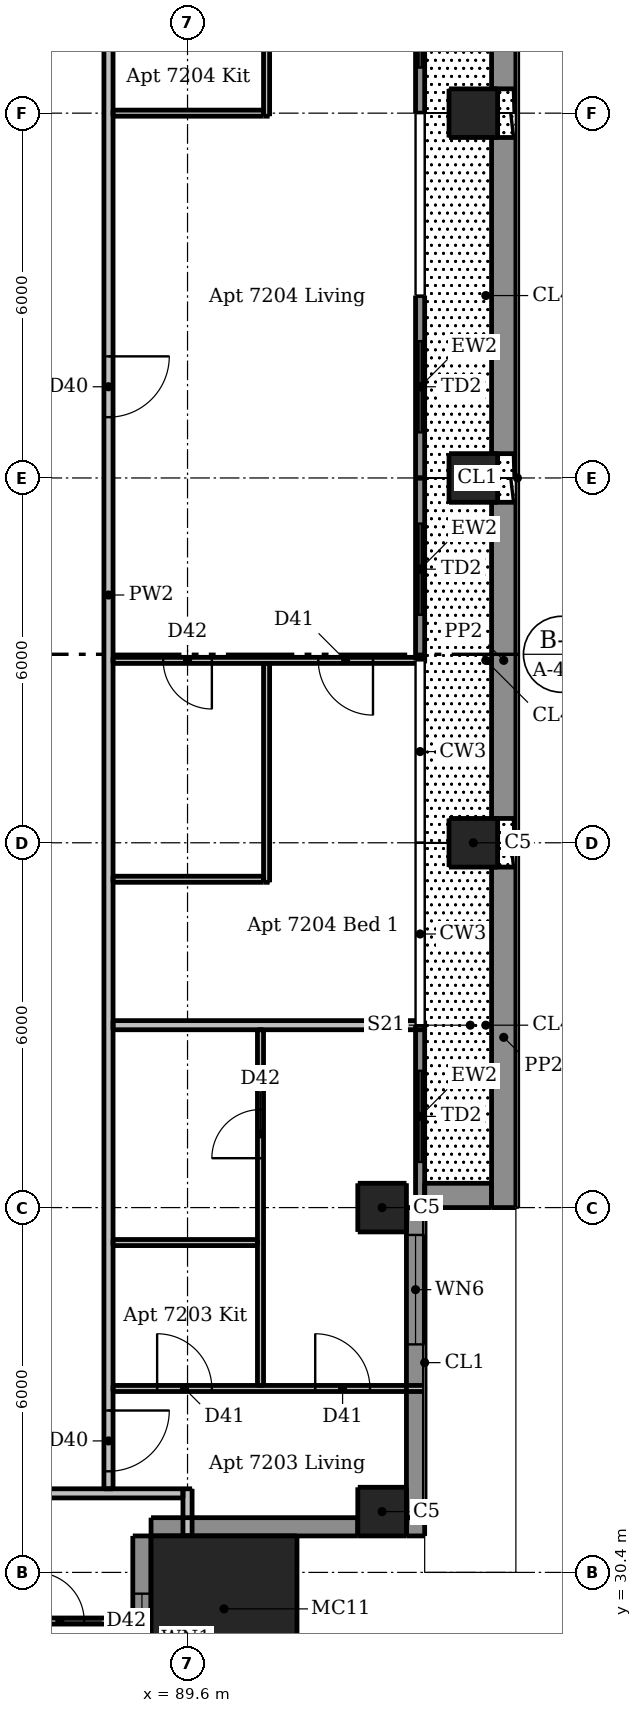
"""IFC4 building model, lengths in metres.
Left out: names, types, materials, properties, quantities, classifications, styles, units other than length and angle.
Written with IfcOpenShell. Run it as: python <this file> out.ifc"""

import sys

from ifc_helpers import new_model, si_unit, direction, frame, frame_2d, origin, origin_2d, place, context, subcontext, project, spatial, rectangle, extrude, element, fill, save


model = new_model("IFC4")
c1 = context("Model", 3, precision=1e-05, world=origin(), true_north=direction((0.0, 1.0)))
c2 = subcontext(c1, "Body", "Model", "MODEL_VIEW")
j1 = project(units=[si_unit("LENGTHUNIT", "METRE"), si_unit("PLANEANGLEUNIT", "RADIAN")], contexts=[c1])
p1 = place(None, origin())
s1 = spatial("IfcSite", under=j1, at=p1, CompositionType="ELEMENT")
p2 = place(p1, origin())
s2 = spatial("IfcBuilding", under=s1, at=p2, CompositionType="ELEMENT")
p3 = place(p2, frame((0.0, 0.0, 268.6)))
s3 = spatial("IfcBuildingStorey", under=s2, at=p3, CompositionType="ELEMENT", Elevation=268.6)
for number, where, z_axis, x_axis in (
    (1, (92.8, 31.4, 0.0), (0.0, 0.0, 1.0), (1.0, 0.0, 0.0)),
    (2, (92.8, 36.4, 0.0), (0.0, 0.0, 1.0), (1.0, 0.0, 0.0)),
):
    element("IfcColumn", number, at=place(p3, frame(where, z_axis=z_axis, x_axis=x_axis)), inside=s3, PredefinedType="COLUMN", context=c2, shape_type="SweptSolid", body=[
        extrude(rectangle(XDim=0.8, YDim=0.8, at=origin_2d()), origin(), (0.0, 0.0, 1.0), 3.05),
    ])
for number, where, z_axis, x_axis in (
    (3, (94.3, 42.4, 0.0), (0.0, 0.0, 1.0), (1.0, 0.0, 0.0)),
    (4, (94.3, 48.4, 0.0), (0.0, 0.0, 1.0), (1.0, 0.0, 0.0)),
    (5, (94.3, 54.4, 0.0), (0.0, 0.0, 1.0), (1.0, 0.0, 0.0)),
):
    element("IfcColumn", number, at=place(p3, frame(where, z_axis=z_axis, x_axis=x_axis)), inside=s3, PredefinedType="COLUMN", context=c2, shape_type="SweptSolid", body=[
        extrude(rectangle(XDim=0.8, YDim=0.8, at=origin_2d()), origin(), (0.0, 0.0, 1.0), 3.3),
    ])
p4 = place(p3, frame((90.2, 29.8, 0.0), z_axis=(0.0, 0.0, 1.0), x_axis=(1.0, 0.0, 0.0)))
e6 = element("IfcColumn", 6, at=p4, inside=s3, PredefinedType="COLUMN", context=c2, shape_type="SweptSolid", body=[
    extrude(rectangle(XDim=2.4, YDim=2.4, at=origin_2d()), origin(), (0.0, 0.0, 1.0), 3.3),
])
p5 = place(p3, frame((88.85, 27.6, 0.0), z_axis=(0.0, 0.0, 1.0), x_axis=(0.0, 1.0, 0.0)))
e7 = element("IfcWall", 7, at=p5, inside=s3, PredefinedType="SOLIDWALL", context=c2, shape_type="SweptSolid", body=[
    extrude(rectangle(XDim=3.4, YDim=0.3, at=frame_2d((1.7, 0.0))), origin(), (0.0, 0.0, 1.0), 3.05),
])
p6 = place(p5, frame((0.95, 0.0, 0.9)))
e8 = element("IfcOpeningElement", 8, at=p6, cuts=e7, PredefinedType="OPENING", context=c2, shape_type="SweptSolid", body=[
    extrude(rectangle(XDim=1.5, YDim=1.5, at=frame_2d((0.75, 0.75))), frame((0.0, 0.16, 0.0), z_axis=(0.0, -1.0, 0.0), x_axis=(1.0, 0.0, 0.0)), (0.0, 0.0, 1.0), 0.32),
])
p7 = place(p3, frame((89.0, 31.15, 0.0), z_axis=(0.0, 0.0, 1.0), x_axis=(1.0, 0.0, 0.0)))
e9 = element("IfcWall", 9, at=p7, inside=s3, PredefinedType="SOLIDWALL", context=c2, shape_type="SweptSolid", body=[
    extrude(rectangle(XDim=3.4, YDim=0.3, at=frame_2d((1.7, 0.0))), origin(), (0.0, 0.0, 1.0), 3.05),
])
p8 = place(p3, frame((93.2, 31.15, 0.0), z_axis=(0.0, 0.0, 1.0), x_axis=(1.0, 0.0, 0.0)))
e10 = element("IfcWall", 10, at=p8, inside=s3, PredefinedType="SOLIDWALL", context=c2, shape_type="SweptSolid", body=[
    extrude(rectangle(XDim=0.3, YDim=0.3, at=frame_2d((0.15, 0.0))), origin(), (0.0, 0.0, 1.0), 3.05),
])
p9 = place(p3, frame((93.35, 31.3, 0.0), z_axis=(0.0, 0.0, 1.0), x_axis=(0.0, 1.0, 0.0)))
e11 = element("IfcWall", 11, at=p9, inside=s3, PredefinedType="SOLIDWALL", context=c2, shape_type="SweptSolid", body=[
    extrude(rectangle(XDim=5.1, YDim=0.3, at=frame_2d((2.55, 0.0))), origin(), (0.0, 0.0, 1.0), 3.05),
])
p10 = place(p9, frame((2.85, 0.0, 0.15)))
e12 = element("IfcOpeningElement", 12, at=p10, cuts=e11, PredefinedType="OPENING", context=c2, shape_type="SweptSolid", body=[
    extrude(rectangle(XDim=1.8, YDim=2.1, at=frame_2d((0.9, 1.05))), frame((0.0, 0.16, 0.0), z_axis=(0.0, -1.0, 0.0), x_axis=(1.0, 0.0, 0.0)), (0.0, 0.0, 1.0), 0.32),
])
p11 = place(p3, frame((93.425, 36.4, 0.0), z_axis=(0.0, 0.0, 1.0), x_axis=(0.0, 1.0, 0.0)))
e13 = element("IfcWall", 13, at=p11, inside=s3, PredefinedType="SOLIDWALL", context=c2, shape_type="SweptSolid", body=[
    extrude(rectangle(XDim=3.0, YDim=0.15, at=frame_2d((1.5, 0.0))), origin(), (0.0, 0.0, 1.0), 3.05),
])
p12 = place(p11, frame((0.75, 0.0, 0.0)))
e14 = element("IfcOpeningElement", 14, at=p12, cuts=e13, PredefinedType="OPENING", context=c2, shape_type="SweptSolid", body=[
    extrude(rectangle(XDim=1.5, YDim=2.4, at=frame_2d((0.75, 1.2))), frame((0.0, 0.085, 0.0), z_axis=(0.0, -1.0, 0.0), x_axis=(1.0, 0.0, 0.0)), (0.0, 0.0, 1.0), 0.17),
])
p13 = place(p3, frame((93.425, 45.4, 0.0), z_axis=(0.0, 0.0, 1.0), x_axis=(0.0, 1.0, 0.0)))
e15 = element("IfcWall", 15, at=p13, inside=s3, PredefinedType="SOLIDWALL", context=c2, shape_type="SweptSolid", body=[
    extrude(rectangle(XDim=3.0, YDim=0.15, at=frame_2d((1.5, 0.0))), origin(), (0.0, 0.0, 1.0), 3.05),
])
p14 = place(p13, frame((0.75, 0.0, 0.0)))
e16 = element("IfcOpeningElement", 16, at=p14, cuts=e15, PredefinedType="OPENING", context=c2, shape_type="SweptSolid", body=[
    extrude(rectangle(XDim=1.5, YDim=2.4, at=frame_2d((0.75, 1.2))), frame((0.0, 0.085, 0.0), z_axis=(0.0, -1.0, 0.0), x_axis=(1.0, 0.0, 0.0)), (0.0, 0.0, 1.0), 0.17),
])
p15 = place(p3, frame((93.425, 48.4, 0.0), z_axis=(0.0, 0.0, 1.0), x_axis=(0.0, 1.0, 0.0)))
e17 = element("IfcWall", 17, at=p15, inside=s3, PredefinedType="SOLIDWALL", context=c2, shape_type="SweptSolid", body=[
    extrude(rectangle(XDim=3.0, YDim=0.15, at=frame_2d((1.5, 0.0))), origin(), (0.0, 0.0, 1.0), 3.05),
])
p16 = place(p15, frame((0.75, 0.0, 0.0)))
e18 = element("IfcOpeningElement", 18, at=p16, cuts=e17, PredefinedType="OPENING", context=c2, shape_type="SweptSolid", body=[
    extrude(rectangle(XDim=1.5, YDim=2.4, at=frame_2d((0.75, 1.2))), frame((0.0, 0.085, 0.0), z_axis=(0.0, -1.0, 0.0), x_axis=(1.0, 0.0, 0.0)), (0.0, 0.0, 1.0), 0.17),
])
p17 = place(p3, frame((93.425, 54.4, 0.0), z_axis=(0.0, 0.0, 1.0), x_axis=(0.0, 1.0, 0.0)))
e19 = element("IfcWall", 19, at=p17, inside=s3, PredefinedType="SOLIDWALL", context=c2, shape_type="SweptSolid", body=[
    extrude(rectangle(XDim=3.0, YDim=0.15, at=frame_2d((1.5, 0.0))), origin(), (0.0, 0.0, 1.0), 3.05),
])
p18 = place(p17, frame((0.75, 0.0, 0.0)))
e20 = element("IfcOpeningElement", 20, at=p18, cuts=e19, PredefinedType="OPENING", context=c2, shape_type="SweptSolid", body=[
    extrude(rectangle(XDim=1.5, YDim=2.4, at=frame_2d((0.75, 1.2))), frame((0.0, 0.085, 0.0), z_axis=(0.0, -1.0, 0.0), x_axis=(1.0, 0.0, 0.0)), (0.0, 0.0, 1.0), 0.17),
])
p19 = place(p3, frame((94.8, 36.4, 0.03), z_axis=(0.0, 0.0, 1.0), x_axis=(0.0, 1.0, 0.0)))
e21 = element("IfcWall", 21, at=p19, inside=s3, PredefinedType="PARAPET", context=c2, shape_type="SweptSolid", body=[
    extrude(rectangle(XDim=5.6, YDim=0.4, at=frame_2d((2.8, 0.0))), origin(), (0.0, 0.0, 1.0), 1.1),
])
p20 = place(p3, frame((93.5, 36.6, 0.03), z_axis=(0.0, 0.0, 1.0), x_axis=(1.0, 0.0, 0.0)))
e22 = element("IfcWall", 22, at=p20, inside=s3, PredefinedType="PARAPET", context=c2, shape_type="SweptSolid", body=[
    extrude(rectangle(XDim=1.1, YDim=0.4, at=frame_2d((0.55, 0.0))), origin(), (0.0, 0.0, 1.0), 1.1),
])
for number, where, z_axis, x_axis in (
    (23, (94.8, 42.8, 0.03), (0.0, 0.0, 1.0), (0.0, 1.0, 0.0)),
    (24, (94.8, 48.8, 0.03), (0.0, 0.0, 1.0), (0.0, 1.0, 0.0)),
    (25, (94.8, 54.8, 0.03), (0.0, 0.0, 1.0), (0.0, 1.0, 0.0)),
):
    element("IfcWall", number, at=place(p3, frame(where, z_axis=z_axis, x_axis=x_axis)), inside=s3, PredefinedType="PARAPET", context=c2, shape_type="SweptSolid", body=[
        extrude(rectangle(XDim=5.2, YDim=0.4, at=frame_2d((2.6, 0.0))), origin(), (0.0, 0.0, 1.0), 1.1),
    ])
p21 = place(p3, frame((90.8, 33.475, 0.0), z_axis=(0.0, 0.0, 1.0), x_axis=(0.0, 1.0, 0.0)))
e26 = element("IfcWall", 26, at=p21, inside=s3, PredefinedType="PARTITIONING", context=c2, shape_type="SweptSolid", body=[
    extrude(rectangle(XDim=5.85, YDim=0.1, at=frame_2d((2.925, 0.0))), origin(), (0.0, 0.0, 1.0), 3.05),
])
p22 = place(p21, frame((3.738, 0.0, 0.0)))
e27 = element("IfcOpeningElement", 27, at=p22, cuts=e26, PredefinedType="OPENING", context=c2, shape_type="SweptSolid", body=[
    extrude(rectangle(XDim=0.8, YDim=2.1, at=frame_2d((0.4, 1.05))), frame((0.0, 0.06, 0.0), z_axis=(0.0, -1.0, 0.0), x_axis=(1.0, 0.0, 0.0)), (0.0, 0.0, 1.0), 0.12),
])
p23 = place(p3, frame((90.9, 41.75, 0.0), z_axis=(0.0, 0.0, 1.0), x_axis=(0.0, 1.0, 0.0)))
e28 = element("IfcWall", 28, at=p23, inside=s3, PredefinedType="PARTITIONING", context=c2, shape_type="SweptSolid", body=[
    extrude(rectangle(XDim=3.6, YDim=0.1, at=frame_2d((1.8, 0.0))), origin(), (0.0, 0.0, 1.0), 3.05),
])
p24 = place(p3, frame((90.9, 54.35, 0.0), z_axis=(0.0, 0.0, 1.0), x_axis=(0.0, 1.0, 0.0)))
e29 = element("IfcWall", 29, at=p24, inside=s3, PredefinedType="PARTITIONING", context=c2, shape_type="SweptSolid", body=[
    extrude(rectangle(XDim=5.975, YDim=0.1, at=frame_2d((2.987, 0.0))), origin(), (0.0, 0.0, 1.0), 3.05),
])
p25 = place(p24, frame((1.1, 0.0, 0.0)))
e30 = element("IfcOpeningElement", 30, at=p25, cuts=e29, PredefinedType="OPENING", context=c2, shape_type="SweptSolid", body=[
    extrude(rectangle(XDim=0.9, YDim=2.1, at=frame_2d((0.45, 1.05))), frame((0.0, 0.06, 0.0), z_axis=(0.0, -1.0, 0.0), x_axis=(1.0, 0.0, 0.0)), (0.0, 0.0, 1.0), 0.12),
])
p26 = place(p24, frame((4.15, 0.0, 0.0)))
e31 = element("IfcOpeningElement", 31, at=p26, cuts=e29, PredefinedType="OPENING", context=c2, shape_type="SweptSolid", body=[
    extrude(rectangle(XDim=0.8, YDim=2.1, at=frame_2d((0.4, 1.05))), frame((0.0, 0.06, 0.0), z_axis=(0.0, -1.0, 0.0), x_axis=(1.0, 0.0, 0.0)), (0.0, 0.0, 1.0), 0.12),
])
p27 = place(p3, frame((88.375, 54.4, 0.0), z_axis=(0.0, 0.0, 1.0), x_axis=(1.0, 0.0, 0.0)))
e32 = element("IfcWall", 32, at=p27, inside=s3, PredefinedType="PARTITIONING", context=c2, shape_type="SweptSolid", body=[
    extrude(rectangle(XDim=2.475, YDim=0.1, at=frame_2d((1.238, 0.0))), origin(), (0.0, 0.0, 1.0), 2.59),
])
p28 = place(p3, frame((93.5, 45.4, 0.0), z_axis=(0.0, 0.0, 1.0), x_axis=(-1.0, 0.0, 0.0)))
e33 = element("IfcWall", 33, at=p28, inside=s3, PredefinedType="PARTITIONING", context=c2, shape_type="SweptSolid", body=[
    extrude(rectangle(XDim=5.125, YDim=0.1, at=frame_2d((2.562, 0.0))), origin(), (0.0, 0.0, 1.0), 3.05),
])
p29 = place(p28, frame((0.85, 0.0, 0.0)))
e34 = element("IfcOpeningElement", 34, at=p29, cuts=e33, PredefinedType="OPENING", context=c2, shape_type="SweptSolid", body=[
    extrude(rectangle(XDim=0.9, YDim=2.1, at=frame_2d((0.45, 1.05))), frame((0.0, 0.06, 0.0), z_axis=(0.0, -1.0, 0.0), x_axis=(1.0, 0.0, 0.0)), (0.0, 0.0, 1.0), 0.12),
])
p30 = place(p28, frame((3.5, 0.0, 0.0)))
e35 = element("IfcOpeningElement", 35, at=p30, cuts=e33, PredefinedType="OPENING", context=c2, shape_type="SweptSolid", body=[
    extrude(rectangle(XDim=0.8, YDim=2.1, at=frame_2d((0.4, 1.05))), frame((0.0, 0.06, 0.0), z_axis=(0.0, -1.0, 0.0), x_axis=(1.0, 0.0, 0.0)), (0.0, 0.0, 1.0), 0.12),
])
p31 = place(p3, frame((88.375, 41.8, 0.0), z_axis=(0.0, 0.0, 1.0), x_axis=(1.0, 0.0, 0.0)))
e36 = element("IfcWall", 36, at=p31, inside=s3, PredefinedType="PARTITIONING", context=c2, shape_type="SweptSolid", body=[
    extrude(rectangle(XDim=2.475, YDim=0.1, at=frame_2d((1.238, 0.0))), origin(), (0.0, 0.0, 1.0), 3.05),
])
p32 = place(p3, frame((88.375, 35.825, 0.0), z_axis=(0.0, 0.0, 1.0), x_axis=(1.0, 0.0, 0.0)))
e37 = element("IfcWall", 37, at=p32, inside=s3, PredefinedType="PARTITIONING", context=c2, shape_type="SweptSolid", body=[
    extrude(rectangle(XDim=2.375, YDim=0.1, at=frame_2d((1.188, 0.0))), origin(), (0.0, 0.0, 1.0), 3.05),
])
p33 = place(p3, frame((88.375, 33.425, 0.0), z_axis=(0.0, 0.0, 1.0), x_axis=(1.0, 0.0, 0.0)))
e38 = element("IfcWall", 38, at=p33, inside=s3, PredefinedType="PARTITIONING", context=c2, shape_type="SweptSolid", body=[
    extrude(rectangle(XDim=5.125, YDim=0.1, at=frame_2d((2.562, 0.0))), origin(), (0.0, 0.0, 1.0), 3.05),
])
p34 = place(p33, frame((0.725, 0.0, 0.0)))
e39 = element("IfcOpeningElement", 39, at=p34, cuts=e38, PredefinedType="OPENING", context=c2, shape_type="SweptSolid", body=[
    extrude(rectangle(XDim=0.9, YDim=2.1, at=frame_2d((0.45, 1.05))), frame((0.0, 0.06, 0.0), z_axis=(0.0, -1.0, 0.0), x_axis=(1.0, 0.0, 0.0)), (0.0, 0.0, 1.0), 0.12),
])
p35 = place(p33, frame((3.325, 0.0, 0.0)))
e40 = element("IfcOpeningElement", 40, at=p35, cuts=e38, PredefinedType="OPENING", context=c2, shape_type="SweptSolid", body=[
    extrude(rectangle(XDim=0.9, YDim=2.1, at=frame_2d((0.45, 1.05))), frame((0.0, 0.06, 0.0), z_axis=(0.0, -1.0, 0.0), x_axis=(1.0, 0.0, 0.0)), (0.0, 0.0, 1.0), 0.12),
])
p36 = place(p3, frame((86.05, 29.6, 0.0), z_axis=(0.0, 0.0, 1.0), x_axis=(1.0, 0.0, 0.0)))
e41 = element("IfcWall", 41, at=p36, inside=s3, PredefinedType="PARTITIONING", context=c2, shape_type="SweptSolid", body=[
    extrude(rectangle(XDim=2.75, YDim=0.1, at=frame_2d((1.375, 0.0))), origin(), (0.0, 0.0, 1.0), 3.05),
])
p37 = place(p36, frame((1.05, 0.0, 0.0)))
e42 = element("IfcOpeningElement", 42, at=p37, cuts=e41, PredefinedType="OPENING", context=c2, shape_type="SweptSolid", body=[
    extrude(rectangle(XDim=0.8, YDim=2.1, at=frame_2d((0.4, 1.05))), frame((0.0, 0.06, 0.0), z_axis=(0.0, -1.0, 0.0), x_axis=(1.0, 0.0, 0.0)), (0.0, 0.0, 1.0), 0.12),
])
p38 = place(p3, frame((88.3, 61.175, 0.0), z_axis=(0.0, 0.0, 1.0), x_axis=(0.0, -1.0, 0.0)))
e43 = element("IfcWall", 43, at=p38, inside=s3, PredefinedType="PARTITIONING", context=c2, shape_type="SweptSolid", body=[
    extrude(rectangle(XDim=29.4, YDim=0.15, at=frame_2d((14.7, 0.0))), origin(), (0.0, 0.0, 1.0), 3.05),
])
p39 = place(p38, frame((28.113, 0.0, 0.0)))
e44 = element("IfcOpeningElement", 44, at=p39, cuts=e43, PredefinedType="OPENING", context=c2, shape_type="SweptSolid", body=[
    extrude(rectangle(XDim=1.0, YDim=2.1, at=frame_2d((0.5, 1.05))), frame((0.0, 0.085, 0.0), z_axis=(0.0, -1.0, 0.0), x_axis=(1.0, 0.0, 0.0)), (0.0, 0.0, 1.0), 0.17),
])
p40 = place(p38, frame((10.775, 0.0, 0.0)))
e45 = element("IfcOpeningElement", 45, at=p40, cuts=e43, PredefinedType="OPENING", context=c2, shape_type="SweptSolid", body=[
    extrude(rectangle(XDim=1.0, YDim=2.1, at=frame_2d((0.5, 1.05))), frame((0.0, 0.085, 0.0), z_axis=(0.0, -1.0, 0.0), x_axis=(1.0, 0.0, 0.0)), (0.0, 0.0, 1.0), 0.17),
])
p41 = place(p3, frame((89.6, 31.0, 0.0), z_axis=(0.0, 0.0, 1.0), x_axis=(0.0, 1.0, 0.0)))
e46 = element("IfcWall", 46, at=p41, inside=s3, PredefinedType="PARTITIONING", context=c2, shape_type="SweptSolid", body=[
    extrude(rectangle(XDim=0.775, YDim=0.15, at=frame_2d((0.387, 0.0))), origin(), (0.0, 0.0, 1.0), 3.05),
])
p42 = place(p3, frame((88.375, 39.4, 0.0), z_axis=(0.0, 0.0, 1.0), x_axis=(1.0, 0.0, 0.0)))
e47 = element("IfcWall", 47, at=p42, inside=s3, PredefinedType="PARTITIONING", context=c2, shape_type="SweptSolid", body=[
    extrude(rectangle(XDim=5.125, YDim=0.15, at=frame_2d((2.562, 0.0))), origin(), (0.0, 0.0, 1.0), 3.05),
])
p43 = place(p3, frame((89.525, 31.7, 0.0), z_axis=(0.0, 0.0, 1.0), x_axis=(-1.0, 0.0, 0.0)))
e48 = element("IfcWall", 48, at=p43, inside=s3, PredefinedType="PARTITIONING", context=c2, shape_type="SweptSolid", body=[
    extrude(rectangle(XDim=30.55, YDim=0.15, at=frame_2d((15.275, 0.0))), origin(), (0.0, 0.0, 1.0), 3.05),
])
p44 = place(p43, frame((28.275, 0.0, 0.0)))
e49 = element("IfcOpeningElement", 49, at=p44, cuts=e48, PredefinedType="OPENING", context=c2, shape_type="SweptSolid", body=[
    extrude(rectangle(XDim=1.0, YDim=2.1, at=frame_2d((0.5, 1.05))), frame((0.0, 0.085, 0.0), z_axis=(0.0, -1.0, 0.0), x_axis=(1.0, 0.0, 0.0)), (0.0, 0.0, 1.0), 0.17),
])
p45 = place(p43, frame((11.425, 0.0, 0.0)))
e50 = element("IfcOpeningElement", 50, at=p45, cuts=e48, PredefinedType="OPENING", context=c2, shape_type="SweptSolid", body=[
    extrude(rectangle(XDim=1.0, YDim=2.1, at=frame_2d((0.5, 1.05))), frame((0.0, 0.085, 0.0), z_axis=(0.0, -1.0, 0.0), x_axis=(1.0, 0.0, 0.0)), (0.0, 0.0, 1.0), 0.17),
])
p46 = place(p6, origin())
e51 = element("IfcWindow", 51, at=p46, inside=s3, PartitioningType="DOUBLE_PANEL_VERTICAL", PredefinedType="WINDOW", context=c2, shape_type="SweptSolid", body=[
    extrude(rectangle(XDim=1.5, YDim=1.5, at=frame_2d((0.75, 0.75))), frame((0.0, 0.03, 0.0), z_axis=(0.0, -1.0, 0.0), x_axis=(1.0, 0.0, 0.0)), (0.0, 0.0, 1.0), 0.06),
])
fill(e8, e51)
p47 = place(p10, origin())
e52 = element("IfcWindow", 52, at=p47, inside=s3, PartitioningType="DOUBLE_PANEL_VERTICAL", PredefinedType="WINDOW", context=c2, shape_type="SweptSolid", body=[
    extrude(rectangle(XDim=1.8, YDim=2.1, at=frame_2d((0.9, 1.05))), frame((0.0, 0.03, 0.0), z_axis=(0.0, -1.0, 0.0), x_axis=(1.0, 0.0, 0.0)), (0.0, 0.0, 1.0), 0.06),
])
fill(e12, e52)
p48 = place(p12, origin())
e53 = element("IfcDoor", 53, at=p48, inside=s3, OperationType="DOUBLE_DOOR_SLIDING", PredefinedType="DOOR", context=c2, shape_type="SweptSolid", body=[
    extrude(rectangle(XDim=1.5, YDim=2.4, at=frame_2d((0.75, 1.2))), frame((0.0, 0.025, 0.0), z_axis=(0.0, -1.0, 0.0), x_axis=(1.0, 0.0, 0.0)), (0.0, 0.0, 1.0), 0.05),
])
fill(e14, e53)
p49 = place(p14, origin())
e54 = element("IfcDoor", 54, at=p49, inside=s3, OperationType="DOUBLE_DOOR_SLIDING", PredefinedType="DOOR", context=c2, shape_type="SweptSolid", body=[
    extrude(rectangle(XDim=1.5, YDim=2.4, at=frame_2d((0.75, 1.2))), frame((0.0, 0.025, 0.0), z_axis=(0.0, -1.0, 0.0), x_axis=(1.0, 0.0, 0.0)), (0.0, 0.0, 1.0), 0.05),
])
fill(e16, e54)
p50 = place(p16, origin())
e55 = element("IfcDoor", 55, at=p50, inside=s3, OperationType="DOUBLE_DOOR_SLIDING", PredefinedType="DOOR", context=c2, shape_type="SweptSolid", body=[
    extrude(rectangle(XDim=1.5, YDim=2.4, at=frame_2d((0.75, 1.2))), frame((0.0, 0.025, 0.0), z_axis=(0.0, -1.0, 0.0), x_axis=(1.0, 0.0, 0.0)), (0.0, 0.0, 1.0), 0.05),
])
fill(e18, e55)
p51 = place(p18, origin())
e56 = element("IfcDoor", 56, at=p51, inside=s3, OperationType="DOUBLE_DOOR_SLIDING", PredefinedType="DOOR", context=c2, shape_type="SweptSolid", body=[
    extrude(rectangle(XDim=1.5, YDim=2.4, at=frame_2d((0.75, 1.2))), frame((0.0, 0.025, 0.0), z_axis=(0.0, -1.0, 0.0), x_axis=(1.0, 0.0, 0.0)), (0.0, 0.0, 1.0), 0.05),
])
fill(e20, e56)
p52 = place(p37, origin())
e57 = element("IfcDoor", 57, at=p52, inside=s3, OperationType="SINGLE_SWING_LEFT", PredefinedType="DOOR", context=c2, shape_type="SweptSolid", body=[
    extrude(rectangle(XDim=0.8, YDim=2.1, at=frame_2d((0.4, 1.05))), frame((0.0, 0.025, 0.0), z_axis=(0.0, -1.0, 0.0), x_axis=(1.0, 0.0, 0.0)), (0.0, 0.0, 1.0), 0.05),
])
fill(e42, e57)
p53 = place(p39, origin())
e58 = element("IfcDoor", 58, at=p53, inside=s3, OperationType="SINGLE_SWING_LEFT", PredefinedType="DOOR", context=c2, shape_type="SweptSolid", body=[
    extrude(rectangle(XDim=1.0, YDim=2.1, at=frame_2d((0.5, 1.05))), frame((0.0, 0.025, 0.0), z_axis=(0.0, -1.0, 0.0), x_axis=(1.0, 0.0, 0.0)), (0.0, 0.0, 1.0), 0.05),
])
fill(e44, e58)
p54 = place(p34, origin())
e59 = element("IfcDoor", 59, at=p54, inside=s3, OperationType="SINGLE_SWING_LEFT", PredefinedType="DOOR", context=c2, shape_type="SweptSolid", body=[
    extrude(rectangle(XDim=0.9, YDim=2.1, at=frame_2d((0.45, 1.05))), frame((0.0, 0.025, 0.0), z_axis=(0.0, -1.0, 0.0), x_axis=(1.0, 0.0, 0.0)), (0.0, 0.0, 1.0), 0.05),
])
fill(e39, e59)
p55 = place(p35, origin())
e60 = element("IfcDoor", 60, at=p55, inside=s3, OperationType="SINGLE_SWING_LEFT", PredefinedType="DOOR", context=c2, shape_type="SweptSolid", body=[
    extrude(rectangle(XDim=0.9, YDim=2.1, at=frame_2d((0.45, 1.05))), frame((0.0, 0.025, 0.0), z_axis=(0.0, -1.0, 0.0), x_axis=(1.0, 0.0, 0.0)), (0.0, 0.0, 1.0), 0.05),
])
fill(e40, e60)
p56 = place(p22, origin())
e61 = element("IfcDoor", 61, at=p56, inside=s3, OperationType="SINGLE_SWING_LEFT", PredefinedType="DOOR", context=c2, shape_type="SweptSolid", body=[
    extrude(rectangle(XDim=0.8, YDim=2.1, at=frame_2d((0.4, 1.05))), frame((0.0, 0.025, 0.0), z_axis=(0.0, -1.0, 0.0), x_axis=(1.0, 0.0, 0.0)), (0.0, 0.0, 1.0), 0.05),
])
fill(e27, e61)
p57 = place(p40, origin())
e62 = element("IfcDoor", 62, at=p57, inside=s3, OperationType="SINGLE_SWING_LEFT", PredefinedType="DOOR", context=c2, shape_type="SweptSolid", body=[
    extrude(rectangle(XDim=1.0, YDim=2.1, at=frame_2d((0.5, 1.05))), frame((0.0, 0.025, 0.0), z_axis=(0.0, -1.0, 0.0), x_axis=(1.0, 0.0, 0.0)), (0.0, 0.0, 1.0), 0.05),
])
fill(e45, e62)
p58 = place(p29, origin())
e63 = element("IfcDoor", 63, at=p58, inside=s3, OperationType="SINGLE_SWING_LEFT", PredefinedType="DOOR", context=c2, shape_type="SweptSolid", body=[
    extrude(rectangle(XDim=0.9, YDim=2.1, at=frame_2d((0.45, 1.05))), frame((0.0, 0.025, 0.0), z_axis=(0.0, -1.0, 0.0), x_axis=(1.0, 0.0, 0.0)), (0.0, 0.0, 1.0), 0.05),
])
fill(e34, e63)
p59 = place(p30, origin())
e64 = element("IfcDoor", 64, at=p59, inside=s3, OperationType="SINGLE_SWING_LEFT", PredefinedType="DOOR", context=c2, shape_type="SweptSolid", body=[
    extrude(rectangle(XDim=0.8, YDim=2.1, at=frame_2d((0.4, 1.05))), frame((0.0, 0.025, 0.0), z_axis=(0.0, -1.0, 0.0), x_axis=(1.0, 0.0, 0.0)), (0.0, 0.0, 1.0), 0.05),
])
fill(e35, e64)
save(model, sys.argv[1])
